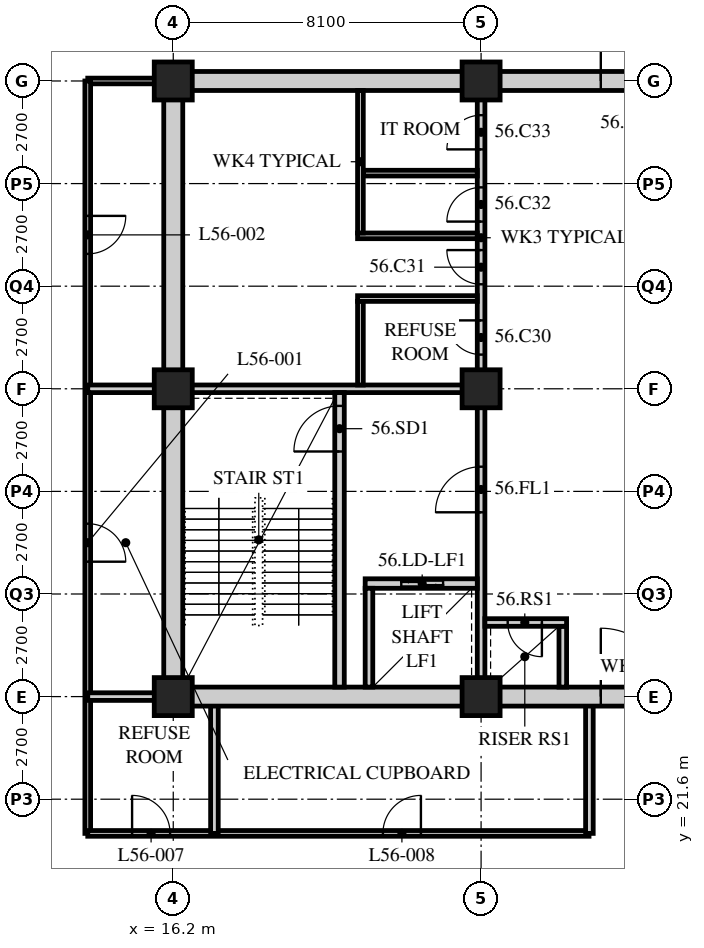
"""IFC4 building model, lengths in metres.
Left out: names, types, materials, properties, quantities, classifications, styles, units other than length and angle.
Written with IfcOpenShell. Run it as: python <this file> out.ifc"""

import sys

from ifc_helpers import new_model, si_unit, direction, frame, frame_2d, origin, origin_2d, place, context, subcontext, project, spatial, rectangle, hollow_rectangle, extrude, element, fill, save


model = new_model("IFC4")
c1 = context("Model", 3, precision=1e-05, world=origin(), true_north=direction((0.0, 1.0)))
c2 = subcontext(c1, "Body", "Model", "MODEL_VIEW")
j1 = project(units=[si_unit("LENGTHUNIT", "METRE"), si_unit("PLANEANGLEUNIT", "RADIAN")], contexts=[c1])
p1 = place(None, origin())
s1 = spatial("IfcSite", under=j1, at=p1, CompositionType="ELEMENT")
p2 = place(p1, origin())
s2 = spatial("IfcBuilding", under=s1, at=p2, CompositionType="ELEMENT")
p3 = place(p2, frame((0.0, 0.0, 217.2)))
s3 = spatial("IfcBuildingStorey", under=s2, at=p3, CompositionType="ELEMENT", Elevation=217.2)
for number, where, z_axis, x_axis in (
    (1, (16.2, 24.3, 0.0), (0.0, 0.0, 1.0), (1.0, 0.0, 0.0)),
    (2, (16.2, 32.4, 0.0), (0.0, 0.0, 1.0), (1.0, 0.0, 0.0)),
    (3, (16.2, 40.5, 0.0), (0.0, 0.0, 1.0), (1.0, 0.0, 0.0)),
    (4, (24.3, 24.3, 0.0), (0.0, 0.0, 1.0), (1.0, 0.0, 0.0)),
    (5, (24.3, 32.4, 0.0), (0.0, 0.0, 1.0), (1.0, 0.0, 0.0)),
    (6, (24.3, 40.5, 0.0), (0.0, 0.0, 1.0), (1.0, 0.0, 0.0)),
):
    element("IfcColumn", number, at=place(p3, frame(where, z_axis=z_axis, x_axis=x_axis)), inside=s3, PredefinedType="COLUMN", context=c2, shape_type="SweptSolid", body=[
        extrude(hollow_rectangle(XDim=1.0, YDim=1.0, WallThickness=0.1, at=origin_2d()), origin(), (0.0, 0.0, 1.0), 3.6),
    ])
p4 = place(p3, frame((16.0, 40.5, 0.0), z_axis=(0.0, 0.0, 1.0), x_axis=(-1.0, 0.0, 0.0)))
e7 = element("IfcWall", 7, at=p4, inside=s3, PredefinedType="PARTITIONING", context=c2, shape_type="SweptSolid", body=[
    extrude(rectangle(XDim=2.05, YDim=0.15, at=frame_2d((1.025, 0.0))), origin(), (0.0, 0.0, 1.0), 3.39),
])
p5 = place(p3, frame((13.95, 40.5, 0.0), z_axis=(0.0, 0.0, 1.0), x_axis=(0.0, -1.0, 0.0)))
e8 = element("IfcWall", 8, at=p5, inside=s3, PredefinedType="PARTITIONING", context=c2, shape_type="SweptSolid", body=[
    extrude(rectangle(XDim=19.8, YDim=0.15, at=frame_2d((9.9, 0.0))), origin(), (0.0, 0.0, 1.0), 3.39),
])
p6 = place(p5, frame((11.65, 0.0, 0.0)))
e9 = element("IfcOpeningElement", 9, at=p6, cuts=e8, PredefinedType="OPENING", context=c2, shape_type="SweptSolid", body=[
    extrude(rectangle(XDim=1.0, YDim=2.1, at=frame_2d((0.5, 1.05))), frame((0.0, 0.085, 0.0), z_axis=(0.0, -1.0, 0.0), x_axis=(1.0, 0.0, 0.0)), (0.0, 0.0, 1.0), 0.17),
])
p7 = place(p5, frame((3.55, 0.0, 0.0)))
e10 = element("IfcOpeningElement", 10, at=p7, cuts=e8, PredefinedType="OPENING", context=c2, shape_type="SweptSolid", body=[
    extrude(rectangle(XDim=1.0, YDim=2.1, at=frame_2d((0.5, 1.05))), frame((0.0, 0.085, 0.0), z_axis=(0.0, -1.0, 0.0), x_axis=(1.0, 0.0, 0.0)), (0.0, 0.0, 1.0), 0.17),
])
p8 = place(p3, frame((13.95, 20.7, 0.0), z_axis=(0.0, 0.0, 1.0), x_axis=(1.0, 0.0, 0.0)))
e11 = element("IfcWall", 11, at=p8, inside=s3, PredefinedType="PARTITIONING", context=c2, shape_type="SweptSolid", body=[
    extrude(rectangle(XDim=13.19, YDim=0.15, at=frame_2d((6.595, 0.0))), origin(), (0.0, 0.0, 1.0), 3.39),
])
p9 = place(p8, frame((1.167, 0.0, 0.0)))
e12 = element("IfcOpeningElement", 12, at=p9, cuts=e11, PredefinedType="OPENING", context=c2, shape_type="SweptSolid", body=[
    extrude(rectangle(XDim=1.0, YDim=2.1, at=frame_2d((0.5, 1.05))), frame((0.0, 0.085, 0.0), z_axis=(0.0, -1.0, 0.0), x_axis=(1.0, 0.0, 0.0)), (0.0, 0.0, 1.0), 0.17),
])
p10 = place(p8, frame((7.767, 0.0, 0.0)))
e13 = element("IfcOpeningElement", 13, at=p10, cuts=e11, PredefinedType="OPENING", context=c2, shape_type="SweptSolid", body=[
    extrude(rectangle(XDim=1.0, YDim=2.1, at=frame_2d((0.5, 1.05))), frame((0.0, 0.085, 0.0), z_axis=(0.0, -1.0, 0.0), x_axis=(1.0, 0.0, 0.0)), (0.0, 0.0, 1.0), 0.17),
])
p11 = place(p3, frame((13.95, 32.4, 0.0), z_axis=(0.0, 0.0, 1.0), x_axis=(1.0, 0.0, 0.0)))
e14 = element("IfcWall", 14, at=p11, inside=s3, PredefinedType="SOLIDWALL", context=c2, shape_type="SweptSolid", body=[
    extrude(rectangle(XDim=2.25, YDim=0.2, at=frame_2d((1.125, 0.0))), origin(), (0.0, 0.0, 1.0), 3.39),
])
for number, where, z_axis, x_axis in (
    (15, (17.283, 20.7, 0.0), (0.0, 0.0, 1.0), (0.0, 1.0, 0.0)),
    (16, (27.15, 20.7, 0.0), (0.0, 0.0, 1.0), (0.0, 1.0, 0.0)),
):
    element("IfcWall", number, at=place(p3, frame(where, z_axis=z_axis, x_axis=x_axis)), inside=s3, PredefinedType="SOLIDWALL", context=c2, shape_type="SweptSolid", body=[
        extrude(rectangle(XDim=3.6, YDim=0.2, at=frame_2d((1.8, 0.0))), origin(), (0.0, 0.0, 1.0), 3.39),
    ])
p12 = place(p3, frame((13.95, 24.3, 0.0), z_axis=(0.0, 0.0, 1.0), x_axis=(1.0, 0.0, 0.0)))
e17 = element("IfcWall", 17, at=p12, inside=s3, PredefinedType="SOLIDWALL", context=c2, shape_type="SweptSolid", body=[
    extrude(rectangle(XDim=2.25, YDim=0.2, at=frame_2d((1.125, 0.0))), origin(), (0.0, 0.0, 1.0), 3.39),
])
p13 = place(p3, frame((15.95, 24.3, 0.0), z_axis=(0.0, 0.0, 1.0), x_axis=(1.0, 0.0, 0.0)))
e18 = element("IfcWall", 18, at=p13, inside=s3, PredefinedType="SOLIDWALL", context=c2, shape_type="SweptSolid", body=[
    extrude(rectangle(XDim=24.8, YDim=0.5, at=frame_2d((12.4, 0.0))), origin(), (0.0, 0.0, 1.0), 2.74),
])
p14 = place(p13, frame((11.5, 0.0, 0.0)))
e19 = element("IfcOpeningElement", 19, at=p14, cuts=e18, PredefinedType="OPENING", context=c2, shape_type="SweptSolid", body=[
    extrude(rectangle(XDim=1.8, YDim=2.4, at=frame_2d((0.9, 1.2))), frame((0.0, 0.26, 0.0), z_axis=(0.0, -1.0, 0.0), x_axis=(1.0, 0.0, 0.0)), (0.0, 0.0, 1.0), 0.52),
])
p15 = place(p3, frame((15.95, 40.5, 0.0), z_axis=(0.0, 0.0, 1.0), x_axis=(1.0, 0.0, 0.0)))
e20 = element("IfcWall", 20, at=p15, inside=s3, PredefinedType="SOLIDWALL", context=c2, shape_type="SweptSolid", body=[
    extrude(rectangle(XDim=24.8, YDim=0.5, at=frame_2d((12.4, 0.0))), origin(), (0.0, 0.0, 1.0), 2.74),
])
p16 = place(p15, frame((11.5, 0.0, 0.0)))
e21 = element("IfcOpeningElement", 21, at=p16, cuts=e20, PredefinedType="OPENING", context=c2, shape_type="SweptSolid", body=[
    extrude(rectangle(XDim=1.8, YDim=2.4, at=frame_2d((0.9, 1.2))), frame((0.0, 0.26, 0.0), z_axis=(0.0, -1.0, 0.0), x_axis=(1.0, 0.0, 0.0)), (0.0, 0.0, 1.0), 0.52),
])
p17 = place(p3, frame((16.2, 24.55, 0.0), z_axis=(0.0, 0.0, 1.0), x_axis=(0.0, 1.0, 0.0)))
e22 = element("IfcWall", 22, at=p17, inside=s3, PredefinedType="SOLIDWALL", context=c2, shape_type="SweptSolid", body=[
    extrude(rectangle(XDim=15.7, YDim=0.5, at=frame_2d((7.85, 0.0))), origin(), (0.0, 0.0, 1.0), 2.778),
])
p18 = place(p3, frame((16.45, 32.4, 0.0), z_axis=(0.0, 0.0, 1.0), x_axis=(1.0, 0.0, 0.0)))
e23 = element("IfcWall", 23, at=p18, inside=s3, PredefinedType="SOLIDWALL", context=c2, shape_type="SweptSolid", body=[
    extrude(rectangle(XDim=7.95, YDim=0.2, at=frame_2d((3.975, 0.0))), origin(), (0.0, 0.0, 1.0), 2.778),
])
p19 = place(p3, frame((24.3, 24.55, 0.0), z_axis=(0.0, 0.0, 1.0), x_axis=(0.0, 1.0, 0.0)))
e24 = element("IfcWall", 24, at=p19, inside=s3, PredefinedType="SOLIDWALL", context=c2, shape_type="SweptSolid", body=[
    extrude(rectangle(XDim=7.75, YDim=0.2, at=frame_2d((3.875, 0.0))), origin(), (0.0, 0.0, 1.0), 2.778),
])
p20 = place(p19, frame((4.6, 0.0, 0.0)))
e25 = element("IfcOpeningElement", 25, at=p20, cuts=e24, PredefinedType="OPENING", context=c2, shape_type="SweptSolid", body=[
    extrude(rectangle(XDim=1.2, YDim=2.1, at=frame_2d((0.6, 1.05))), frame((0.0, 0.11, 0.0), z_axis=(0.0, -1.0, 0.0), x_axis=(1.0, 0.0, 0.0)), (0.0, 0.0, 1.0), 0.22),
])
p21 = place(p3, frame((20.575, 24.55, 0.0), z_axis=(0.0, 0.0, 1.0), x_axis=(0.0, 1.0, 0.0)))
e26 = element("IfcWall", 26, at=p21, inside=s3, PredefinedType="SOLIDWALL", context=c2, shape_type="SweptSolid", body=[
    extrude(rectangle(XDim=7.75, YDim=0.25, at=frame_2d((3.875, 0.0))), origin(), (0.0, 0.0, 1.0), 3.39),
])
p22 = place(p21, frame((6.2, 0.0, 0.0)))
e27 = element("IfcOpeningElement", 27, at=p22, cuts=e26, PredefinedType="OPENING", context=c2, shape_type="SweptSolid", body=[
    extrude(rectangle(XDim=1.2, YDim=2.1, at=frame_2d((0.6, 1.05))), frame((0.0, 0.135, 0.0), z_axis=(0.0, -1.0, 0.0), x_axis=(1.0, 0.0, 0.0)), (0.0, 0.0, 1.0), 0.27),
])
p23 = place(p3, frame((21.25, 27.275, 0.0), z_axis=(0.0, 0.0, 1.0), x_axis=(1.0, 0.0, 0.0)))
e28 = element("IfcWall", 28, at=p23, inside=s3, PredefinedType="SOLIDWALL", context=c2, shape_type="SweptSolid", body=[
    extrude(rectangle(XDim=2.95, YDim=0.25, at=frame_2d((1.475, 0.0))), origin(), (0.0, 0.0, 1.0), 3.39),
])
p24 = place(p23, frame((0.95, 0.0, 0.0)))
e29 = element("IfcOpeningElement", 29, at=p24, cuts=e28, PredefinedType="OPENING", context=c2, shape_type="SweptSolid", body=[
    extrude(rectangle(XDim=1.1, YDim=2.4, at=frame_2d((0.55, 1.2))), frame((0.0, 0.135, 0.0), z_axis=(0.0, -1.0, 0.0), x_axis=(1.0, 0.0, 0.0)), (0.0, 0.0, 1.0), 0.27),
])
p25 = place(p3, frame((21.35, 24.55, 0.0), z_axis=(0.0, 0.0, 1.0), x_axis=(0.0, 1.0, 0.0)))
e30 = element("IfcWall", 30, at=p25, inside=s3, PredefinedType="SOLIDWALL", context=c2, shape_type="SweptSolid", body=[
    extrude(rectangle(XDim=2.6, YDim=0.2, at=frame_2d((1.3, 0.0))), origin(), (0.0, 0.0, 1.0), 3.39),
])
p26 = place(p3, frame((26.45, 24.55, 0.0), z_axis=(0.0, 0.0, 1.0), x_axis=(0.0, 1.0, 0.0)))
e31 = element("IfcWall", 31, at=p26, inside=s3, PredefinedType="SOLIDWALL", context=c2, shape_type="SweptSolid", body=[
    extrude(rectangle(XDim=1.6, YDim=0.2, at=frame_2d((0.8, 0.0))), origin(), (0.0, 0.0, 1.0), 3.39),
])
p27 = place(p3, frame((24.4, 26.25, 0.0), z_axis=(0.0, 0.0, 1.0), x_axis=(1.0, 0.0, 0.0)))
e32 = element("IfcWall", 32, at=p27, inside=s3, PredefinedType="SOLIDWALL", context=c2, shape_type="SweptSolid", body=[
    extrude(rectangle(XDim=2.15, YDim=0.2, at=frame_2d((1.075, 0.0))), origin(), (0.0, 0.0, 1.0), 3.39),
])
p28 = place(p27, frame((0.6, 0.0, 0.0)))
e33 = element("IfcOpeningElement", 33, at=p28, cuts=e32, PredefinedType="OPENING", context=c2, shape_type="SweptSolid", body=[
    extrude(rectangle(XDim=0.9, YDim=2.1, at=frame_2d((0.45, 1.05))), frame((0.0, 0.11, 0.0), z_axis=(0.0, -1.0, 0.0), x_axis=(1.0, 0.0, 0.0)), (0.0, 0.0, 1.0), 0.22),
])
p29 = place(p3, frame((24.3, 32.5, 0.0), z_axis=(0.0, 0.0, 1.0), x_axis=(0.0, 1.0, 0.0)))
e34 = element("IfcWall", 34, at=p29, inside=s3, PredefinedType="PARTITIONING", context=c2, shape_type="SweptSolid", body=[
    extrude(rectangle(XDim=7.75, YDim=0.2, at=frame_2d((3.875, 0.0))), origin(), (0.0, 0.0, 1.0), 2.778),
])
p30 = place(p29, frame((0.8, 0.0, 0.0)))
e35 = element("IfcOpeningElement", 35, at=p30, cuts=e34, PredefinedType="OPENING", context=c2, shape_type="SweptSolid", body=[
    extrude(rectangle(XDim=0.9, YDim=2.1, at=frame_2d((0.45, 1.05))), frame((0.0, 0.11, 0.0), z_axis=(0.0, -1.0, 0.0), x_axis=(1.0, 0.0, 0.0)), (0.0, 0.0, 1.0), 0.22),
])
p31 = place(p29, frame((2.65, 0.0, 0.0)))
e36 = element("IfcOpeningElement", 36, at=p31, cuts=e34, PredefinedType="OPENING", context=c2, shape_type="SweptSolid", body=[
    extrude(rectangle(XDim=0.9, YDim=2.1, at=frame_2d((0.45, 1.05))), frame((0.0, 0.11, 0.0), z_axis=(0.0, -1.0, 0.0), x_axis=(1.0, 0.0, 0.0)), (0.0, 0.0, 1.0), 0.22),
])
p32 = place(p29, frame((4.3, 0.0, 0.0)))
e37 = element("IfcOpeningElement", 37, at=p32, cuts=e34, PredefinedType="OPENING", context=c2, shape_type="SweptSolid", body=[
    extrude(rectangle(XDim=0.9, YDim=2.1, at=frame_2d((0.45, 1.05))), frame((0.0, 0.11, 0.0), z_axis=(0.0, -1.0, 0.0), x_axis=(1.0, 0.0, 0.0)), (0.0, 0.0, 1.0), 0.22),
])
p33 = place(p29, frame((6.2, 0.0, 0.0)))
e38 = element("IfcOpeningElement", 38, at=p33, cuts=e34, PredefinedType="OPENING", context=c2, shape_type="SweptSolid", body=[
    extrude(rectangle(XDim=0.9, YDim=2.1, at=frame_2d((0.45, 1.05))), frame((0.0, 0.11, 0.0), z_axis=(0.0, -1.0, 0.0), x_axis=(1.0, 0.0, 0.0)), (0.0, 0.0, 1.0), 0.22),
])
for number, where, z_axis, x_axis in (
    (39, (21.05, 34.775, 0.0), (0.0, 0.0, 1.0), (1.0, 0.0, 0.0)),
    (40, (21.05, 36.425, 0.0), (0.0, 0.0, 1.0), (1.0, 0.0, 0.0)),
):
    element("IfcWall", number, at=place(p3, frame(where, z_axis=z_axis, x_axis=x_axis)), inside=s3, PredefinedType="PARTITIONING", context=c2, shape_type="SweptSolid", body=[
        extrude(rectangle(XDim=3.15, YDim=0.15, at=frame_2d((1.575, 0.0))), origin(), (0.0, 0.0, 1.0), 3.39),
    ])
p34 = place(p3, frame((21.2, 38.075, 0.0), z_axis=(0.0, 0.0, 1.0), x_axis=(1.0, 0.0, 0.0)))
e41 = element("IfcWall", 41, at=p34, inside=s3, PredefinedType="PARTITIONING", context=c2, shape_type="SweptSolid", body=[
    extrude(rectangle(XDim=3.0, YDim=0.15, at=frame_2d((1.5, 0.0))), origin(), (0.0, 0.0, 1.0), 3.39),
])
p35 = place(p3, frame((21.125, 32.5, 0.0), z_axis=(0.0, 0.0, 1.0), x_axis=(0.0, 1.0, 0.0)))
e42 = element("IfcWall", 42, at=p35, inside=s3, PredefinedType="PARTITIONING", context=c2, shape_type="SweptSolid", body=[
    extrude(rectangle(XDim=2.2, YDim=0.15, at=frame_2d((1.1, 0.0))), origin(), (0.0, 0.0, 1.0), 3.39),
])
p36 = place(p3, frame((21.125, 36.5, 0.0), z_axis=(0.0, 0.0, 1.0), x_axis=(0.0, 1.0, 0.0)))
e43 = element("IfcWall", 43, at=p36, inside=s3, PredefinedType="PARTITIONING", context=c2, shape_type="SweptSolid", body=[
    extrude(rectangle(XDim=3.75, YDim=0.15, at=frame_2d((1.875, 0.0))), origin(), (0.0, 0.0, 1.0), 3.39),
])
p37 = place(p6, origin())
e44 = element("IfcDoor", 44, at=p37, inside=s3, OperationType="SINGLE_SWING_RIGHT", PredefinedType="DOOR", context=c2, shape_type="SweptSolid", body=[
    extrude(rectangle(XDim=1.0, YDim=2.1, at=frame_2d((0.5, 1.05))), frame((0.0, 0.025, 0.0), z_axis=(0.0, -1.0, 0.0), x_axis=(1.0, 0.0, 0.0)), (0.0, 0.0, 1.0), 0.05),
])
fill(e9, e44)
p38 = place(p7, origin())
e45 = element("IfcDoor", 45, at=p38, inside=s3, OperationType="SINGLE_SWING_LEFT", PredefinedType="DOOR", context=c2, shape_type="SweptSolid", body=[
    extrude(rectangle(XDim=1.0, YDim=2.1, at=frame_2d((0.5, 1.05))), frame((0.0, 0.025, 0.0), z_axis=(0.0, -1.0, 0.0), x_axis=(1.0, 0.0, 0.0)), (0.0, 0.0, 1.0), 0.05),
])
fill(e10, e45)
p39 = place(p9, origin())
e46 = element("IfcDoor", 46, at=p39, inside=s3, OperationType="SINGLE_SWING_LEFT", PredefinedType="DOOR", context=c2, shape_type="SweptSolid", body=[
    extrude(rectangle(XDim=1.0, YDim=2.1, at=frame_2d((0.5, 1.05))), frame((0.0, 0.025, 0.0), z_axis=(0.0, -1.0, 0.0), x_axis=(1.0, 0.0, 0.0)), (0.0, 0.0, 1.0), 0.05),
])
fill(e12, e46)
p40 = place(p10, origin())
e47 = element("IfcDoor", 47, at=p40, inside=s3, OperationType="SINGLE_SWING_RIGHT", PredefinedType="DOOR", context=c2, shape_type="SweptSolid", body=[
    extrude(rectangle(XDim=1.0, YDim=2.1, at=frame_2d((0.5, 1.05))), frame((0.0, 0.025, 0.0), z_axis=(0.0, -1.0, 0.0), x_axis=(1.0, 0.0, 0.0)), (0.0, 0.0, 1.0), 0.05),
])
fill(e13, e47)
p41 = place(p30, origin())
e48 = element("IfcDoor", 48, at=p41, inside=s3, OperationType="SINGLE_SWING_RIGHT", PredefinedType="DOOR", context=c2, shape_type="SweptSolid", body=[
    extrude(rectangle(XDim=0.9, YDim=2.1, at=frame_2d((0.45, 1.05))), frame((0.0, 0.025, 0.0), z_axis=(0.0, -1.0, 0.0), x_axis=(1.0, 0.0, 0.0)), (0.0, 0.0, 1.0), 0.05),
])
fill(e35, e48)
p42 = place(p31, origin())
e49 = element("IfcDoor", 49, at=p42, inside=s3, OperationType="SINGLE_SWING_RIGHT", PredefinedType="DOOR", context=c2, shape_type="SweptSolid", body=[
    extrude(rectangle(XDim=0.9, YDim=2.1, at=frame_2d((0.45, 1.05))), frame((0.0, 0.025, 0.0), z_axis=(0.0, -1.0, 0.0), x_axis=(1.0, 0.0, 0.0)), (0.0, 0.0, 1.0), 0.05),
])
fill(e36, e49)
p43 = place(p32, origin())
e50 = element("IfcDoor", 50, at=p43, inside=s3, OperationType="SINGLE_SWING_LEFT", PredefinedType="DOOR", context=c2, shape_type="SweptSolid", body=[
    extrude(rectangle(XDim=0.9, YDim=2.1, at=frame_2d((0.45, 1.05))), frame((0.0, 0.025, 0.0), z_axis=(0.0, -1.0, 0.0), x_axis=(1.0, 0.0, 0.0)), (0.0, 0.0, 1.0), 0.05),
])
fill(e37, e50)
p44 = place(p33, origin())
e51 = element("IfcDoor", 51, at=p44, inside=s3, OperationType="SINGLE_SWING_LEFT", PredefinedType="DOOR", context=c2, shape_type="SweptSolid", body=[
    extrude(rectangle(XDim=0.9, YDim=2.1, at=frame_2d((0.45, 1.05))), frame((0.0, 0.025, 0.0), z_axis=(0.0, -1.0, 0.0), x_axis=(1.0, 0.0, 0.0)), (0.0, 0.0, 1.0), 0.05),
])
fill(e38, e51)
p45 = place(p22, origin())
e52 = element("IfcDoor", 52, at=p45, inside=s3, OperationType="SINGLE_SWING_LEFT", PredefinedType="DOOR", context=c2, shape_type="SweptSolid", body=[
    extrude(rectangle(XDim=1.2, YDim=2.1, at=frame_2d((0.6, 1.05))), frame((0.0, 0.025, 0.0), z_axis=(0.0, -1.0, 0.0), x_axis=(1.0, 0.0, 0.0)), (0.0, 0.0, 1.0), 0.05),
])
fill(e27, e52)
p46 = place(p20, origin())
e53 = element("IfcDoor", 53, at=p46, inside=s3, OperationType="SINGLE_SWING_LEFT", PredefinedType="DOOR", context=c2, shape_type="SweptSolid", body=[
    extrude(rectangle(XDim=1.2, YDim=2.1, at=frame_2d((0.6, 1.05))), frame((0.0, 0.025, 0.0), z_axis=(0.0, -1.0, 0.0), x_axis=(1.0, 0.0, 0.0)), (0.0, 0.0, 1.0), 0.05),
])
fill(e25, e53)
p47 = place(p28, origin())
e54 = element("IfcDoor", 54, at=p47, inside=s3, OperationType="SINGLE_SWING_LEFT", PredefinedType="DOOR", context=c2, shape_type="SweptSolid", body=[
    extrude(rectangle(XDim=0.9, YDim=2.1, at=frame_2d((0.45, 1.05))), frame((0.0, 0.025, 0.0), z_axis=(0.0, -1.0, 0.0), x_axis=(1.0, 0.0, 0.0)), (0.0, 0.0, 1.0), 0.05),
])
fill(e33, e54)
p48 = place(p24, origin())
e55 = element("IfcDoor", 55, at=p48, inside=s3, OperationType="DOUBLE_DOOR_SLIDING", PredefinedType="DOOR", context=c2, shape_type="SweptSolid", body=[
    extrude(rectangle(XDim=1.1, YDim=2.4, at=frame_2d((0.55, 1.2))), frame((0.0, 0.025, 0.0), z_axis=(0.0, -1.0, 0.0), x_axis=(1.0, 0.0, 0.0)), (0.0, 0.0, 1.0), 0.05),
])
fill(e29, e55)
p49 = place(p14, origin())
e56 = element("IfcDoor", 56, at=p49, inside=s3, OperationType="DOUBLE_DOOR_SINGLE_SWING", PredefinedType="DOOR", context=c2, shape_type="SweptSolid", body=[
    extrude(rectangle(XDim=1.8, YDim=2.4, at=frame_2d((0.9, 1.2))), frame((0.0, 0.025, 0.0), z_axis=(0.0, -1.0, 0.0), x_axis=(1.0, 0.0, 0.0)), (0.0, 0.0, 1.0), 0.05),
])
fill(e19, e56)
p50 = place(p16, origin())
e57 = element("IfcDoor", 57, at=p50, inside=s3, OperationType="DOUBLE_DOOR_SINGLE_SWING", PredefinedType="DOOR", context=c2, shape_type="SweptSolid", body=[
    extrude(rectangle(XDim=1.8, YDim=2.4, at=frame_2d((0.9, 1.2))), frame((0.0, 0.025, 0.0), z_axis=(0.0, -1.0, 0.0), x_axis=(1.0, 0.0, 0.0)), (0.0, 0.0, 1.0), 0.05),
])
fill(e21, e57)
save(model, sys.argv[1])
